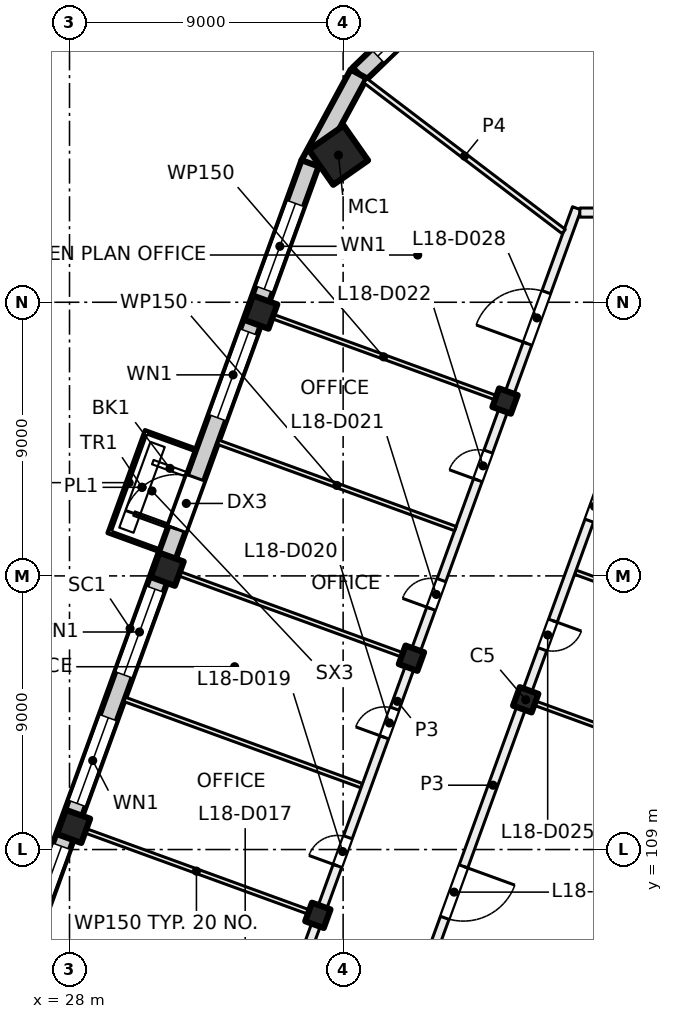
"""IFC4 building model, lengths in metres.
Left out: names, types, materials, properties, quantities, classifications, styles, units other than length and angle.
Written with IfcOpenShell. Run it as: python <this file> out.ifc"""

import sys

from ifc_helpers import new_model, si_unit, direction, frame, frame_2d, origin, origin_2d, place, context, subcontext, project, spatial, rectangle, hollow_rectangle, extrude, element, fill, save


model = new_model("IFC4")
c1 = context("Model", 3, precision=1e-05, world=origin(), true_north=direction((0.0, 1.0)))
c2 = subcontext(c1, "Body", "Model", "MODEL_VIEW")
j1 = project(units=[si_unit("LENGTHUNIT", "METRE"), si_unit("PLANEANGLEUNIT", "RADIAN")], contexts=[c1])
p1 = place(None, origin())
s1 = spatial("IfcSite", under=j1, at=p1, CompositionType="ELEMENT")
p2 = place(p1, origin())
s2 = spatial("IfcBuilding", under=s1, at=p2, CompositionType="ELEMENT")
p3 = place(p2, frame((0.0, 0.0, 81.0)))
s3 = spatial("IfcBuildingStorey", under=s2, at=p3, CompositionType="ELEMENT", Elevation=81.0)
p4 = place(p3, frame((36.846, 131.838, 0.0), z_axis=(0.0, 0.0, 1.0), x_axis=(0.573576436351, -0.819152044289, 0.0)))
e1 = element("IfcColumn", 1, at=p4, inside=s3, PredefinedType="COLUMN", context=c2, shape_type="SweptSolid", body=[
    extrude(hollow_rectangle(XDim=1.4, YDim=1.4, WallThickness=0.04, at=origin_2d()), origin(), (0.0, 0.0, 1.0), 4.0),
])
for number, where, z_axis, x_axis in (
    (2, (43.006, 113.925, 0.0), (0.0, 0.0, 1.0), (-0.342, -0.94, 0.0)),
    (3, (42.325, 123.751, 0.0), (0.0, 0.0, 1.0), (-0.342, -0.94, 0.0)),
    (4, (39.247, 115.293, 0.0), (0.0, 0.0, 1.0), (-0.342, -0.94, 0.0)),
    (5, (36.169, 106.836, 0.0), (0.0, 0.0, 1.0), (-0.342, -0.94, 0.0)),
):
    element("IfcColumn", number, at=place(p3, frame(where, z_axis=z_axis, x_axis=x_axis)), inside=s3, PredefinedType="COLUMN", context=c2, shape_type="SweptSolid", body=[
        extrude(rectangle(XDim=0.65, YDim=0.65, at=origin_2d()), origin(), (0.0, 0.0, 1.0), 4.0),
    ])
for number, where, z_axis, x_axis in (
    (6, (34.291, 126.675, 0.0), (0.0, 0.0, 1.0), (-0.342, -0.94, 0.0)),
    (7, (31.212, 118.218, 0.0), (0.0, 0.0, 1.0), (-0.342, -0.94, 0.0)),
    (8, (28.134, 109.76, 0.0), (0.0, 0.0, 1.0), (-0.342, -0.94, 0.0)),
):
    element("IfcColumn", number, at=place(p3, frame(where, z_axis=z_axis, x_axis=x_axis)), inside=s3, PredefinedType="COLUMN", context=c2, shape_type="SweptSolid", body=[
        extrude(rectangle(XDim=0.85, YDim=0.85, at=origin_2d()), origin(), (0.0, 0.0, 1.0), 4.0),
    ])
p5 = place(p3, frame((52.212, 113.783, 0.0), z_axis=(0.0, 0.0, 1.0), x_axis=(-0.34202521188, -0.939690775968, 0.0)))
e9 = element("IfcWall", 9, at=p5, inside=s3, PredefinedType="SOLIDWALL", context=c2, shape_type="SweptSolid", body=[
    extrude(rectangle(XDim=21.745, YDim=0.6, at=frame_2d((10.873, 0.0))), origin(), (0.0, 0.0, 1.0), 3.625),
])
p6 = place(p5, frame((4.365, 0.0, 0.0)))
e10 = element("IfcOpeningElement", 10, at=p6, cuts=e9, PredefinedType="OPENING", context=c2, shape_type="SweptSolid", body=[
    extrude(rectangle(XDim=1.8, YDim=2.4, at=frame_2d((0.9, 1.2))), frame((0.0, 0.31, 0.0), z_axis=(0.0, -1.0, 0.0), x_axis=(1.0, 0.0, 0.0)), (0.0, 0.0, 1.0), 0.62),
])
p7 = place(p5, frame((8.265, 0.0, 0.9)))
e11 = element("IfcOpeningElement", 11, at=p7, cuts=e9, PredefinedType="OPENING", context=c2, shape_type="SweptSolid", body=[
    extrude(rectangle(XDim=3.0, YDim=2.4, at=frame_2d((1.5, 1.2))), frame((0.0, 0.31, 0.0), z_axis=(0.0, -1.0, 0.0), x_axis=(1.0, 0.0, 0.0)), (0.0, 0.0, 1.0), 0.62),
])
p8 = place(p5, frame((12.765, 0.0, 0.9)))
e12 = element("IfcOpeningElement", 12, at=p8, cuts=e9, PredefinedType="OPENING", context=c2, shape_type="SweptSolid", body=[
    extrude(rectangle(XDim=3.0, YDim=2.4, at=frame_2d((1.5, 1.2))), frame((0.0, 0.31, 0.0), z_axis=(0.0, -1.0, 0.0), x_axis=(1.0, 0.0, 0.0)), (0.0, 0.0, 1.0), 0.62),
])
p9 = place(p5, frame((17.265, 0.0, 0.9)))
e13 = element("IfcOpeningElement", 13, at=p9, cuts=e9, PredefinedType="OPENING", context=c2, shape_type="SweptSolid", body=[
    extrude(rectangle(XDim=3.0, YDim=2.4, at=frame_2d((1.5, 1.2))), frame((0.0, 0.31, 0.0), z_axis=(0.0, -1.0, 0.0), x_axis=(1.0, 0.0, 0.0)), (0.0, 0.0, 1.0), 0.62),
])
p10 = place(p3, frame((37.52, 134.501, 0.0), z_axis=(0.0, 0.0, 1.0), x_axis=(0.72115684486, 0.692771827596, 0.0)))
e14 = element("IfcWall", 14, at=p10, inside=s3, PredefinedType="SOLIDWALL", context=c2, shape_type="SweptSolid", body=[
    extrude(rectangle(XDim=3.303, YDim=0.6, at=frame_2d((1.651, 0.0))), origin(), (0.0, 0.0, 1.0), 3.625),
])
p11 = place(p10, frame((0.856, 0.0, 0.9)))
e15 = element("IfcOpeningElement", 15, at=p11, cuts=e14, PredefinedType="OPENING", context=c2, shape_type="SweptSolid", body=[
    extrude(rectangle(XDim=1.5, YDim=2.4, at=frame_2d((0.75, 1.2))), frame((0.0, 0.31, 0.0), z_axis=(0.0, -1.0, 0.0), x_axis=(1.0, 0.0, 0.0)), (0.0, 0.0, 1.0), 0.62),
])
p12 = place(p3, frame((35.895, 131.53, 0.0), z_axis=(0.0, 0.0, 1.0), x_axis=(0.476531180538, 0.879157570618, 0.0)))
e16 = element("IfcWall", 16, at=p12, inside=s3, PredefinedType="SOLIDWALL", context=c2, shape_type="SweptSolid", body=[
    extrude(rectangle(XDim=3.393, YDim=0.6, at=frame_2d((1.696, 0.0))), origin(), (0.0, 0.0, 1.0), 3.625),
])
p13 = place(p3, frame((24.666, 100.669, 0.0), z_axis=(0.0, 0.0, 1.0), x_axis=(0.34201964167, 0.939692803373, 0.0)))
e17 = element("IfcWall", 17, at=p13, inside=s3, PredefinedType="SOLIDWALL", context=c2, shape_type="SweptSolid", body=[
    extrude(rectangle(XDim=32.884, YDim=0.6, at=frame_2d((16.442, 0.0))), origin(), (0.0, 0.0, 1.0), 3.625),
])
p14 = place(p13, frame((1.48, 0.0, 0.9)))
e18 = element("IfcOpeningElement", 18, at=p14, cuts=e17, PredefinedType="OPENING", context=c2, shape_type="SweptSolid", body=[
    extrude(rectangle(XDim=3.0, YDim=2.4, at=frame_2d((1.5, 1.2))), frame((0.0, 0.31, 0.0), z_axis=(0.0, -1.0, 0.0), x_axis=(1.0, 0.0, 0.0)), (0.0, 0.0, 1.0), 0.62),
])
p15 = place(p13, frame((5.98, 0.0, 0.9)))
e19 = element("IfcOpeningElement", 19, at=p15, cuts=e17, PredefinedType="OPENING", context=c2, shape_type="SweptSolid", body=[
    extrude(rectangle(XDim=3.0, YDim=2.4, at=frame_2d((1.5, 1.2))), frame((0.0, 0.31, 0.0), z_axis=(0.0, -1.0, 0.0), x_axis=(1.0, 0.0, 0.0)), (0.0, 0.0, 1.0), 0.62),
])
p16 = place(p13, frame((10.48, 0.0, 0.9)))
e20 = element("IfcOpeningElement", 20, at=p16, cuts=e17, PredefinedType="OPENING", context=c2, shape_type="SweptSolid", body=[
    extrude(rectangle(XDim=3.0, YDim=2.4, at=frame_2d((1.5, 1.2))), frame((0.0, 0.31, 0.0), z_axis=(0.0, -1.0, 0.0), x_axis=(1.0, 0.0, 0.0)), (0.0, 0.0, 1.0), 0.62),
])
p17 = place(p13, frame((14.98, 0.0, 0.9)))
e21 = element("IfcOpeningElement", 21, at=p17, cuts=e17, PredefinedType="OPENING", context=c2, shape_type="SweptSolid", body=[
    extrude(rectangle(XDim=3.0, YDim=2.4, at=frame_2d((1.5, 1.2))), frame((0.0, 0.31, 0.0), z_axis=(0.0, -1.0, 0.0), x_axis=(1.0, 0.0, 0.0)), (0.0, 0.0, 1.0), 0.62),
])
p18 = place(p13, frame((20.08, 0.0, 0.0)))
e22 = element("IfcOpeningElement", 22, at=p18, cuts=e17, PredefinedType="OPENING", context=c2, shape_type="SweptSolid", body=[
    extrude(rectangle(XDim=1.8, YDim=2.4, at=frame_2d((0.9, 1.2))), frame((0.0, 0.31, 0.0), z_axis=(0.0, -1.0, 0.0), x_axis=(1.0, 0.0, 0.0)), (0.0, 0.0, 1.0), 0.62),
])
p19 = place(p13, frame((23.98, 0.0, 0.9)))
e23 = element("IfcOpeningElement", 23, at=p19, cuts=e17, PredefinedType="OPENING", context=c2, shape_type="SweptSolid", body=[
    extrude(rectangle(XDim=3.0, YDim=2.4, at=frame_2d((1.5, 1.2))), frame((0.0, 0.31, 0.0), z_axis=(0.0, -1.0, 0.0), x_axis=(1.0, 0.0, 0.0)), (0.0, 0.0, 1.0), 0.62),
])
p20 = place(p13, frame((28.48, 0.0, 0.9)))
e24 = element("IfcOpeningElement", 24, at=p20, cuts=e17, PredefinedType="OPENING", context=c2, shape_type="SweptSolid", body=[
    extrude(rectangle(XDim=3.0, YDim=2.4, at=frame_2d((1.5, 1.2))), frame((0.0, 0.31, 0.0), z_axis=(0.0, -1.0, 0.0), x_axis=(1.0, 0.0, 0.0)), (0.0, 0.0, 1.0), 0.62),
])
for number, where, z_axis, x_axis in (
    (25, (28.275, 109.709, 0.0), (0.0, 0.0, 1.0), (0.94, -0.342, 0.0)),
    (26, (29.814, 113.938, 0.0), (0.0, 0.0, 1.0), (0.94, -0.342, 0.0)),
):
    element("IfcWall", number, at=place(p3, frame(where, z_axis=z_axis, x_axis=x_axis)), inside=s3, PredefinedType="PARTITIONING", context=c2, shape_type="SweptSolid", body=[
        extrude(rectangle(XDim=8.301, YDim=0.15, at=frame_2d((4.15, 0.0))), origin(), (0.0, 0.0, 1.0), 3.625),
    ])
p21 = place(p3, frame((31.353, 118.166, 0.0), z_axis=(0.0, 0.0, 1.0), x_axis=(0.939687752599, -0.342033518263, 0.0)))
e27 = element("IfcWall", 27, at=p21, inside=s3, PredefinedType="PARTITIONING", context=c2, shape_type="SweptSolid", body=[
    extrude(rectangle(XDim=8.301, YDim=0.15, at=frame_2d((4.15, 0.0))), origin(), (0.0, 0.0, 1.0), 3.625),
])
p22 = place(p3, frame((32.881, 97.657, 0.0), z_axis=(0.0, 0.0, 1.0), x_axis=(0.342017360004, 0.939693633828, 0.0)))
e28 = element("IfcWall", 28, at=p22, inside=s3, PredefinedType="PARTITIONING", context=c2, shape_type="SweptSolid", body=[
    extrude(rectangle(XDim=34.516, YDim=0.3, at=frame_2d((17.258, 0.0))), origin(), (0.0, 0.0, 1.0), 3.625),
])
p23 = place(p22, frame((2.025, 0.0, 0.0)))
e29 = element("IfcOpeningElement", 29, at=p23, cuts=e28, PredefinedType="OPENING", context=c2, shape_type="SweptSolid", body=[
    extrude(rectangle(XDim=1.2, YDim=2.1, at=frame_2d((0.6, 1.05))), frame((0.0, 0.16, 0.0), z_axis=(0.0, -1.0, 0.0), x_axis=(1.0, 0.0, 0.0)), (0.0, 0.0, 1.0), 0.32),
])
p24 = place(p22, frame((7.0, 0.0, 0.0)))
e30 = element("IfcOpeningElement", 30, at=p24, cuts=e28, PredefinedType="OPENING", context=c2, shape_type="SweptSolid", body=[
    extrude(rectangle(XDim=1.0, YDim=2.1, at=frame_2d((0.5, 1.05))), frame((0.0, 0.16, 0.0), z_axis=(0.0, -1.0, 0.0), x_axis=(1.0, 0.0, 0.0)), (0.0, 0.0, 1.0), 0.32),
])
p25 = place(p22, frame((11.5, 0.0, 0.0)))
e31 = element("IfcOpeningElement", 31, at=p25, cuts=e28, PredefinedType="OPENING", context=c2, shape_type="SweptSolid", body=[
    extrude(rectangle(XDim=1.0, YDim=2.1, at=frame_2d((0.5, 1.05))), frame((0.0, 0.16, 0.0), z_axis=(0.0, -1.0, 0.0), x_axis=(1.0, 0.0, 0.0)), (0.0, 0.0, 1.0), 0.32),
])
p26 = place(p22, frame((16.0, 0.0, 0.0)))
e32 = element("IfcOpeningElement", 32, at=p26, cuts=e28, PredefinedType="OPENING", context=c2, shape_type="SweptSolid", body=[
    extrude(rectangle(XDim=1.0, YDim=2.1, at=frame_2d((0.5, 1.05))), frame((0.0, 0.16, 0.0), z_axis=(0.0, -1.0, 0.0), x_axis=(1.0, 0.0, 0.0)), (0.0, 0.0, 1.0), 0.32),
])
p27 = place(p22, frame((20.5, 0.0, 0.0)))
e33 = element("IfcOpeningElement", 33, at=p27, cuts=e28, PredefinedType="OPENING", context=c2, shape_type="SweptSolid", body=[
    extrude(rectangle(XDim=1.0, YDim=2.1, at=frame_2d((0.5, 1.05))), frame((0.0, 0.16, 0.0), z_axis=(0.0, -1.0, 0.0), x_axis=(1.0, 0.0, 0.0)), (0.0, 0.0, 1.0), 0.32),
])
p28 = place(p22, frame((25.0, 0.0, 0.0)))
e34 = element("IfcOpeningElement", 34, at=p28, cuts=e28, PredefinedType="OPENING", context=c2, shape_type="SweptSolid", body=[
    extrude(rectangle(XDim=1.0, YDim=2.1, at=frame_2d((0.5, 1.05))), frame((0.0, 0.16, 0.0), z_axis=(0.0, -1.0, 0.0), x_axis=(1.0, 0.0, 0.0)), (0.0, 0.0, 1.0), 0.32),
])
p29 = place(p22, frame((29.779, 0.0, 0.0)))
e35 = element("IfcOpeningElement", 35, at=p29, cuts=e28, PredefinedType="OPENING", context=c2, shape_type="SweptSolid", body=[
    extrude(rectangle(XDim=1.8, YDim=2.1, at=frame_2d((0.9, 1.05))), frame((0.0, 0.16, 0.0), z_axis=(0.0, -1.0, 0.0), x_axis=(1.0, 0.0, 0.0)), (0.0, 0.0, 1.0), 0.32),
])
p30 = place(p3, frame((32.892, 122.395, 0.0), z_axis=(0.0, 0.0, 1.0), x_axis=(0.939684311623, -0.3420429717, 0.0)))
e36 = element("IfcWall", 36, at=p30, inside=s3, PredefinedType="PARTITIONING", context=c2, shape_type="SweptSolid", body=[
    extrude(rectangle(XDim=8.301, YDim=0.15, at=frame_2d((4.15, 0.0))), origin(), (0.0, 0.0, 1.0), 3.625),
])
p31 = place(p3, frame((42.231, 123.785, 0.0), z_axis=(0.0, 0.0, 1.0), x_axis=(-0.939687752599, 0.342033518263, 0.0)))
e37 = element("IfcWall", 37, at=p31, inside=s3, PredefinedType="PARTITIONING", context=c2, shape_type="SweptSolid", body=[
    extrude(rectangle(XDim=8.301, YDim=0.15, at=frame_2d((4.15, 0.0))), origin(), (0.0, 0.0, 1.0), 3.625),
])
p32 = place(p3, frame((43.1, 113.891, 0.0), z_axis=(0.0, 0.0, 1.0), x_axis=(0.939670544866, -0.342080790328, 0.0)))
e38 = element("IfcWall", 38, at=p32, inside=s3, PredefinedType="PARTITIONING", context=c2, shape_type="SweptSolid", body=[
    extrude(rectangle(XDim=8.3, YDim=0.15, at=frame_2d((4.15, 0.0))), origin(), (0.0, 0.0, 1.0), 3.625),
])
p33 = place(p3, frame((44.256, 129.327, 0.0), z_axis=(0.0, 0.0, 1.0), x_axis=(-0.796040504107, 0.605243352563, 0.0)))
e39 = element("IfcWall", 39, at=p33, inside=s3, PredefinedType="PARTITIONING", context=c2, shape_type="SweptSolid", body=[
    extrude(rectangle(XDim=8.197, YDim=0.175, at=frame_2d((4.099, 0.0))), origin(), (0.0, 0.0, 1.0), 3.625),
])
p34 = place(p3, frame((44.639, 118.12, 0.0), z_axis=(0.0, 0.0, 1.0), x_axis=(0.939669707102, -0.342083091593, 0.0)))
e40 = element("IfcWall", 40, at=p34, inside=s3, PredefinedType="PARTITIONING", context=c2, shape_type="SweptSolid", body=[
    extrude(rectangle(XDim=8.589, YDim=0.15, at=frame_2d((4.295, 0.0))), origin(), (0.0, 0.0, 1.0), 3.625),
])
p35 = place(p3, frame((44.785, 129.95, 0.0), z_axis=(0.0, 0.0, 1.0), x_axis=(1.0, 0.0, 0.0)))
e41 = element("IfcWall", 41, at=p35, inside=s3, PredefinedType="PARTITIONING", context=c2, shape_type="SweptSolid", body=[
    extrude(rectangle(XDim=19.115, YDim=0.3, at=frame_2d((9.558, 0.0))), origin(), (0.0, 0.0, 1.0), 3.625),
])
p36 = place(p35, frame((15.615, 0.0, 0.0)))
e42 = element("IfcOpeningElement", 42, at=p36, cuts=e41, PredefinedType="OPENING", context=c2, shape_type="SweptSolid", body=[
    extrude(rectangle(XDim=1.2, YDim=2.1, at=frame_2d((0.6, 1.05))), frame((0.0, 0.16, 0.0), z_axis=(0.0, -1.0, 0.0), x_axis=(1.0, 0.0, 0.0)), (0.0, 0.0, 1.0), 0.32),
])
p37 = place(p35, frame((11.115, 0.0, 0.0)))
e43 = element("IfcOpeningElement", 43, at=p37, cuts=e41, PredefinedType="OPENING", context=c2, shape_type="SweptSolid", body=[
    extrude(rectangle(XDim=1.2, YDim=2.1, at=frame_2d((0.6, 1.05))), frame((0.0, 0.16, 0.0), z_axis=(0.0, -1.0, 0.0), x_axis=(1.0, 0.0, 0.0)), (0.0, 0.0, 1.0), 0.32),
])
p38 = place(p35, frame((4.123, 0.0, 0.0)))
e44 = element("IfcOpeningElement", 44, at=p38, cuts=e41, PredefinedType="OPENING", context=c2, shape_type="SweptSolid", body=[
    extrude(rectangle(XDim=1.2, YDim=2.1, at=frame_2d((0.6, 1.05))), frame((0.0, 0.16, 0.0), z_axis=(0.0, -1.0, 0.0), x_axis=(1.0, 0.0, 0.0)), (0.0, 0.0, 1.0), 0.32),
])
p39 = place(p3, frame((47.314, 125.909, 0.0), z_axis=(0.0, 0.0, 1.0), x_axis=(-0.342010770371, -0.939696032209, 0.0)))
e45 = element("IfcWall", 45, at=p39, inside=s3, PredefinedType="PARTITIONING", context=c2, shape_type="SweptSolid", body=[
    extrude(rectangle(XDim=31.485, YDim=0.3, at=frame_2d((15.742, 0.0))), origin(), (0.0, 0.0, 1.0), 3.625),
])
p40 = place(p39, frame((28.259, 0.0, 0.0)))
e46 = element("IfcOpeningElement", 46, at=p40, cuts=e45, PredefinedType="OPENING", context=c2, shape_type="SweptSolid", body=[
    extrude(rectangle(XDim=1.2, YDim=2.1, at=frame_2d((0.6, 1.05))), frame((0.0, 0.16, 0.0), z_axis=(0.0, -1.0, 0.0), x_axis=(1.0, 0.0, 0.0)), (0.0, 0.0, 1.0), 0.32),
])
p41 = place(p39, frame((18.584, 0.0, 0.0)))
e47 = element("IfcOpeningElement", 47, at=p41, cuts=e45, PredefinedType="OPENING", context=c2, shape_type="SweptSolid", body=[
    extrude(rectangle(XDim=1.8, YDim=2.1, at=frame_2d((0.9, 1.05))), frame((0.0, 0.16, 0.0), z_axis=(0.0, -1.0, 0.0), x_axis=(1.0, 0.0, 0.0)), (0.0, 0.0, 1.0), 0.32),
])
p42 = place(p39, frame((9.985, 0.0, 0.0)))
e48 = element("IfcOpeningElement", 48, at=p42, cuts=e45, PredefinedType="OPENING", context=c2, shape_type="SweptSolid", body=[
    extrude(rectangle(XDim=1.0, YDim=2.1, at=frame_2d((0.5, 1.05))), frame((0.0, 0.16, 0.0), z_axis=(0.0, -1.0, 0.0), x_axis=(1.0, 0.0, 0.0)), (0.0, 0.0, 1.0), 0.32),
])
p43 = place(p39, frame((5.484, 0.0, 0.0)))
e49 = element("IfcOpeningElement", 49, at=p43, cuts=e45, PredefinedType="OPENING", context=c2, shape_type="SweptSolid", body=[
    extrude(rectangle(XDim=1.0, YDim=2.1, at=frame_2d((0.5, 1.05))), frame((0.0, 0.16, 0.0), z_axis=(0.0, -1.0, 0.0), x_axis=(1.0, 0.0, 0.0)), (0.0, 0.0, 1.0), 0.32),
])
p44 = place(p11, origin())
e50 = element("IfcWindow", 50, at=p44, inside=s3, PartitioningType="SINGLE_PANEL", PredefinedType="WINDOW", context=c2, shape_type="SweptSolid", body=[
    extrude(rectangle(XDim=1.5, YDim=2.4, at=frame_2d((0.75, 1.2))), frame((0.0, 0.03, 0.0), z_axis=(0.0, -1.0, 0.0), x_axis=(1.0, 0.0, 0.0)), (0.0, 0.0, 1.0), 0.06),
])
fill(e15, e50)
p45 = place(p15, origin())
e51 = element("IfcWindow", 51, at=p45, inside=s3, PartitioningType="SINGLE_PANEL", PredefinedType="WINDOW", context=c2, shape_type="SweptSolid", body=[
    extrude(rectangle(XDim=3.0, YDim=2.4, at=frame_2d((1.5, 1.2))), frame((0.0, 0.03, 0.0), z_axis=(0.0, -1.0, 0.0), x_axis=(1.0, 0.0, 0.0)), (0.0, 0.0, 1.0), 0.06),
])
fill(e19, e51)
p46 = place(p16, origin())
e52 = element("IfcWindow", 52, at=p46, inside=s3, PartitioningType="SINGLE_PANEL", PredefinedType="WINDOW", context=c2, shape_type="SweptSolid", body=[
    extrude(rectangle(XDim=3.0, YDim=2.4, at=frame_2d((1.5, 1.2))), frame((0.0, 0.03, 0.0), z_axis=(0.0, -1.0, 0.0), x_axis=(1.0, 0.0, 0.0)), (0.0, 0.0, 1.0), 0.06),
])
fill(e20, e52)
p47 = place(p17, origin())
e53 = element("IfcWindow", 53, at=p47, inside=s3, PartitioningType="SINGLE_PANEL", PredefinedType="WINDOW", context=c2, shape_type="SweptSolid", body=[
    extrude(rectangle(XDim=3.0, YDim=2.4, at=frame_2d((1.5, 1.2))), frame((0.0, 0.03, 0.0), z_axis=(0.0, -1.0, 0.0), x_axis=(1.0, 0.0, 0.0)), (0.0, 0.0, 1.0), 0.06),
])
fill(e21, e53)
p48 = place(p18, origin())
e54 = element("IfcDoor", 54, at=p48, inside=s3, OperationType="DOUBLE_DOOR_SINGLE_SWING", PredefinedType="DOOR", context=c2, shape_type="SweptSolid", body=[
    extrude(rectangle(XDim=1.8, YDim=2.4, at=frame_2d((0.9, 1.2))), frame((0.0, 0.025, 0.0), z_axis=(0.0, -1.0, 0.0), x_axis=(1.0, 0.0, 0.0)), (0.0, 0.0, 1.0), 0.05),
])
fill(e22, e54)
p49 = place(p19, origin())
e55 = element("IfcWindow", 55, at=p49, inside=s3, PartitioningType="SINGLE_PANEL", PredefinedType="WINDOW", context=c2, shape_type="SweptSolid", body=[
    extrude(rectangle(XDim=3.0, YDim=2.4, at=frame_2d((1.5, 1.2))), frame((0.0, 0.03, 0.0), z_axis=(0.0, -1.0, 0.0), x_axis=(1.0, 0.0, 0.0)), (0.0, 0.0, 1.0), 0.06),
])
fill(e23, e55)
p50 = place(p20, origin())
e56 = element("IfcWindow", 56, at=p50, inside=s3, PartitioningType="SINGLE_PANEL", PredefinedType="WINDOW", context=c2, shape_type="SweptSolid", body=[
    extrude(rectangle(XDim=3.0, YDim=2.4, at=frame_2d((1.5, 1.2))), frame((0.0, 0.03, 0.0), z_axis=(0.0, -1.0, 0.0), x_axis=(1.0, 0.0, 0.0)), (0.0, 0.0, 1.0), 0.06),
])
fill(e24, e56)
p51 = place(p25, origin())
e57 = element("IfcDoor", 57, at=p51, inside=s3, OperationType="SINGLE_SWING_RIGHT", PredefinedType="DOOR", context=c2, shape_type="SweptSolid", body=[
    extrude(rectangle(XDim=1.0, YDim=2.1, at=frame_2d((0.5, 1.05))), frame((0.0, 0.025, 0.0), z_axis=(0.0, -1.0, 0.0), x_axis=(1.0, 0.0, 0.0)), (0.0, 0.0, 1.0), 0.05),
])
fill(e31, e57)
p52 = place(p26, origin())
e58 = element("IfcDoor", 58, at=p52, inside=s3, OperationType="SINGLE_SWING_LEFT", PredefinedType="DOOR", context=c2, shape_type="SweptSolid", body=[
    extrude(rectangle(XDim=1.0, YDim=2.1, at=frame_2d((0.5, 1.05))), frame((0.0, 0.025, 0.0), z_axis=(0.0, -1.0, 0.0), x_axis=(1.0, 0.0, 0.0)), (0.0, 0.0, 1.0), 0.05),
])
fill(e32, e58)
p53 = place(p27, origin())
e59 = element("IfcDoor", 59, at=p53, inside=s3, OperationType="SINGLE_SWING_LEFT", PredefinedType="DOOR", context=c2, shape_type="SweptSolid", body=[
    extrude(rectangle(XDim=1.0, YDim=2.1, at=frame_2d((0.5, 1.05))), frame((0.0, 0.025, 0.0), z_axis=(0.0, -1.0, 0.0), x_axis=(1.0, 0.0, 0.0)), (0.0, 0.0, 1.0), 0.05),
])
fill(e33, e59)
p54 = place(p28, origin())
e60 = element("IfcDoor", 60, at=p54, inside=s3, OperationType="SINGLE_SWING_RIGHT", PredefinedType="DOOR", context=c2, shape_type="SweptSolid", body=[
    extrude(rectangle(XDim=1.0, YDim=2.1, at=frame_2d((0.5, 1.05))), frame((0.0, 0.025, 0.0), z_axis=(0.0, -1.0, 0.0), x_axis=(1.0, 0.0, 0.0)), (0.0, 0.0, 1.0), 0.05),
])
fill(e34, e60)
p55 = place(p41, origin())
e61 = element("IfcDoor", 61, at=p55, inside=s3, OperationType="DOUBLE_DOOR_SINGLE_SWING", PredefinedType="DOOR", context=c2, shape_type="SweptSolid", body=[
    extrude(rectangle(XDim=1.8, YDim=2.1, at=frame_2d((0.9, 1.05))), frame((0.0, 0.025, 0.0), z_axis=(0.0, -1.0, 0.0), x_axis=(1.0, 0.0, 0.0)), (0.0, 0.0, 1.0), 0.05),
])
fill(e47, e61)
p56 = place(p42, origin())
e62 = element("IfcDoor", 62, at=p56, inside=s3, OperationType="SINGLE_SWING_LEFT", PredefinedType="DOOR", context=c2, shape_type="SweptSolid", body=[
    extrude(rectangle(XDim=1.0, YDim=2.1, at=frame_2d((0.5, 1.05))), frame((0.0, 0.025, 0.0), z_axis=(0.0, -1.0, 0.0), x_axis=(1.0, 0.0, 0.0)), (0.0, 0.0, 1.0), 0.05),
])
fill(e48, e62)
p57 = place(p43, origin())
e63 = element("IfcDoor", 63, at=p57, inside=s3, OperationType="SINGLE_SWING_LEFT", PredefinedType="DOOR", context=c2, shape_type="SweptSolid", body=[
    extrude(rectangle(XDim=1.0, YDim=2.1, at=frame_2d((0.5, 1.05))), frame((0.0, 0.025, 0.0), z_axis=(0.0, -1.0, 0.0), x_axis=(1.0, 0.0, 0.0)), (0.0, 0.0, 1.0), 0.05),
])
fill(e49, e63)
p58 = place(p29, origin())
e64 = element("IfcDoor", 64, at=p58, inside=s3, OperationType="DOUBLE_DOOR_SINGLE_SWING", PredefinedType="DOOR", context=c2, shape_type="SweptSolid", body=[
    extrude(rectangle(XDim=1.8, YDim=2.1, at=frame_2d((0.9, 1.05))), frame((0.0, 0.025, 0.0), z_axis=(0.0, -1.0, 0.0), x_axis=(1.0, 0.0, 0.0)), (0.0, 0.0, 1.0), 0.05),
])
fill(e35, e64)
save(model, sys.argv[1])
